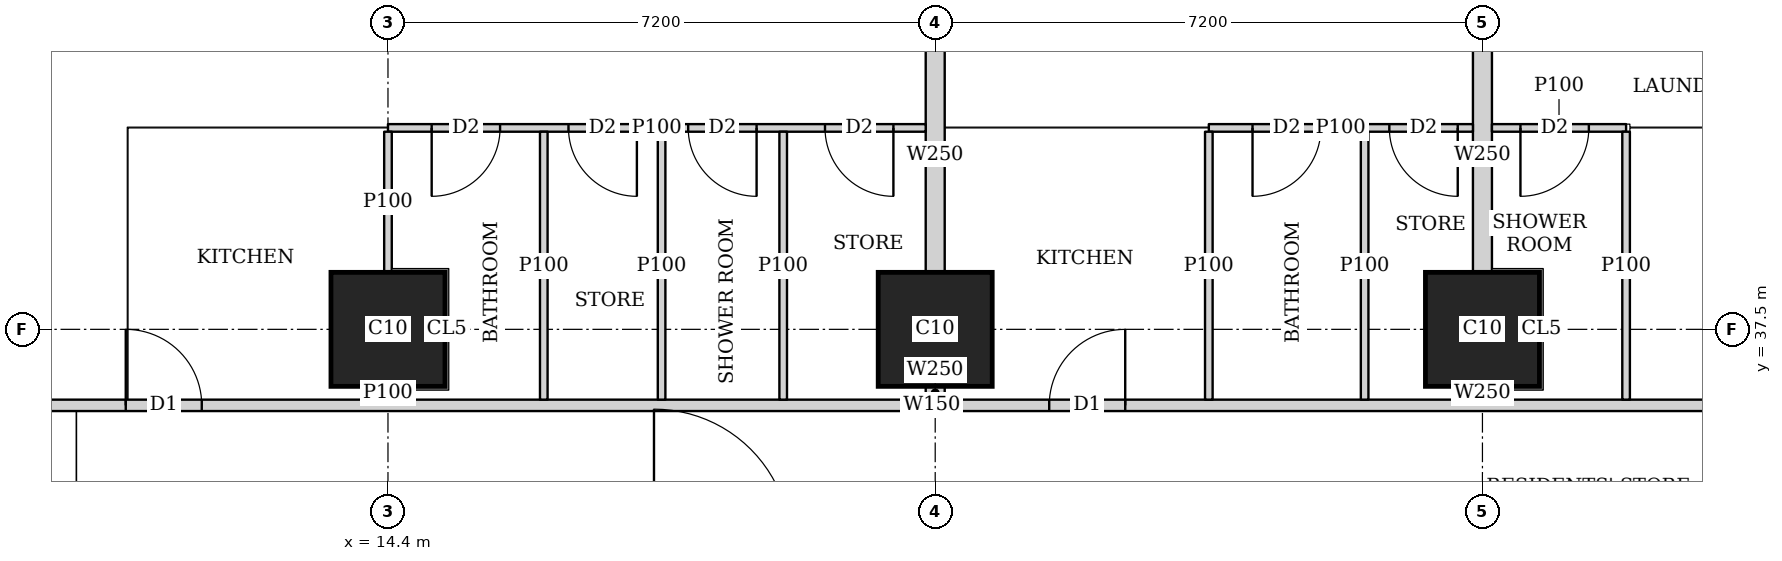
"""IFC4 building model, lengths in metres.
Left out: names, types, materials, properties, quantities, classifications, styles, units other than length and angle.
Written with IfcOpenShell. Run it as: python <this file> out.ifc"""

import sys

from ifc_helpers import new_model, si_unit, direction, frame, frame_2d, origin, origin_2d, place, context, subcontext, project, spatial, rectangle, extrude, element, fill, save


model = new_model("IFC4")
c1 = context("Model", 3, precision=1e-05, world=origin(), true_north=direction((0.0, 1.0)))
c2 = subcontext(c1, "Body", "Model", "MODEL_VIEW")
j1 = project(units=[si_unit("LENGTHUNIT", "METRE"), si_unit("PLANEANGLEUNIT", "RADIAN")], contexts=[c1])
p1 = place(None, origin())
s1 = spatial("IfcSite", under=j1, at=p1, CompositionType="ELEMENT")
p2 = place(p1, origin())
s2 = spatial("IfcBuilding", under=s1, at=p2, CompositionType="ELEMENT")
p3 = place(p2, frame((0.0, 0.0, 184.55)))
s3 = spatial("IfcBuildingStorey", under=s2, at=p3, CompositionType="ELEMENT", Elevation=184.55)
for number, where, z_axis, x_axis in (
    (1, (14.4, 37.5, 0.0), (0.0, 0.0, 1.0), (1.0, 0.0, 0.0)),
    (2, (21.6, 37.5, 0.0), (0.0, 0.0, 1.0), (1.0, 0.0, 0.0)),
    (3, (28.8, 37.5, 0.0), (0.0, 0.0, 1.0), (1.0, 0.0, 0.0)),
):
    element("IfcColumn", number, at=place(p3, frame(where, z_axis=z_axis, x_axis=x_axis)), inside=s3, PredefinedType="COLUMN", context=c2, shape_type="SweptSolid", body=[
        extrude(rectangle(XDim=1.5, YDim=1.5, at=origin_2d()), origin(), (0.0, 0.0, 1.0), 3.75),
    ])
p4 = place(p3, frame((8.35, 36.5, 0.0), z_axis=(0.0, 0.0, 1.0), x_axis=(1.0, 0.0, 0.0)))
e4 = element("IfcWall", 4, at=p4, inside=s3, PredefinedType="SOLIDWALL", context=c2, shape_type="SweptSolid", body=[
    extrude(rectangle(XDim=26.415, YDim=0.15, at=frame_2d((13.208, 0.0))), origin(), (0.0, 0.0, 1.0), 3.45),
])
p5 = place(p4, frame((2.6, 0.0, 0.0)))
e5 = element("IfcOpeningElement", 5, at=p5, cuts=e4, PredefinedType="OPENING", context=c2, shape_type="SweptSolid", body=[
    extrude(rectangle(XDim=1.0, YDim=2.1, at=frame_2d((0.5, 1.05))), frame((0.0, 0.085, 0.0), z_axis=(0.0, -1.0, 0.0), x_axis=(1.0, 0.0, 0.0)), (0.0, 0.0, 1.0), 0.17),
])
p6 = place(p4, frame((14.75, 0.0, 0.0)))
e6 = element("IfcOpeningElement", 6, at=p6, cuts=e4, PredefinedType="OPENING", context=c2, shape_type="SweptSolid", body=[
    extrude(rectangle(XDim=1.0, YDim=2.1, at=frame_2d((0.5, 1.05))), frame((0.0, 0.085, 0.0), z_axis=(0.0, -1.0, 0.0), x_axis=(1.0, 0.0, 0.0)), (0.0, 0.0, 1.0), 0.17),
])
p7 = place(p4, frame((23.923, 0.0, 0.0)))
e7 = element("IfcOpeningElement", 7, at=p7, cuts=e4, PredefinedType="OPENING", context=c2, shape_type="SweptSolid", body=[
    extrude(rectangle(XDim=1.0, YDim=2.1, at=frame_2d((0.5, 1.05))), frame((0.0, 0.085, 0.0), z_axis=(0.0, -1.0, 0.0), x_axis=(1.0, 0.0, 0.0)), (0.0, 0.0, 1.0), 0.17),
])
p8 = place(p3, frame((14.4, 40.15, 0.0), z_axis=(0.0, 0.0, 1.0), x_axis=(1.0, 0.0, 0.0)))
e8 = element("IfcWall", 8, at=p8, inside=s3, PredefinedType="PARTITIONING", context=c2, shape_type="SweptSolid", body=[
    extrude(rectangle(XDim=7.075, YDim=0.1, at=frame_2d((3.538, 0.0))), origin(), (0.0, 0.0, 1.0), 3.45),
])
p9 = place(p8, frame((0.575, 0.0, 0.0)))
e9 = element("IfcOpeningElement", 9, at=p9, cuts=e8, PredefinedType="OPENING", context=c2, shape_type="SweptSolid", body=[
    extrude(rectangle(XDim=0.9, YDim=2.1, at=frame_2d((0.45, 1.05))), frame((0.0, 0.06, 0.0), z_axis=(0.0, -1.0, 0.0), x_axis=(1.0, 0.0, 0.0)), (0.0, 0.0, 1.0), 0.12),
])
p10 = place(p8, frame((3.95, 0.0, 0.0)))
e10 = element("IfcOpeningElement", 10, at=p10, cuts=e8, PredefinedType="OPENING", context=c2, shape_type="SweptSolid", body=[
    extrude(rectangle(XDim=0.9, YDim=2.1, at=frame_2d((0.45, 1.05))), frame((0.0, 0.06, 0.0), z_axis=(0.0, -1.0, 0.0), x_axis=(1.0, 0.0, 0.0)), (0.0, 0.0, 1.0), 0.12),
])
p11 = place(p8, frame((2.375, 0.0, 0.0)))
e11 = element("IfcOpeningElement", 11, at=p11, cuts=e8, PredefinedType="OPENING", context=c2, shape_type="SweptSolid", body=[
    extrude(rectangle(XDim=0.9, YDim=2.1, at=frame_2d((0.45, 1.05))), frame((0.0, 0.06, 0.0), z_axis=(0.0, -1.0, 0.0), x_axis=(1.0, 0.0, 0.0)), (0.0, 0.0, 1.0), 0.12),
])
p12 = place(p8, frame((5.75, 0.0, 0.0)))
e12 = element("IfcOpeningElement", 12, at=p12, cuts=e8, PredefinedType="OPENING", context=c2, shape_type="SweptSolid", body=[
    extrude(rectangle(XDim=0.9, YDim=2.1, at=frame_2d((0.45, 1.05))), frame((0.0, 0.06, 0.0), z_axis=(0.0, -1.0, 0.0), x_axis=(1.0, 0.0, 0.0)), (0.0, 0.0, 1.0), 0.12),
])
p13 = place(p3, frame((14.4, 36.575, 0.0), z_axis=(0.0, 0.0, 1.0), x_axis=(0.0, 1.0, 0.0)))
e13 = element("IfcWall", 13, at=p13, inside=s3, PredefinedType="PARTITIONING", context=c2, shape_type="SweptSolid", body=[
    extrude(rectangle(XDim=0.174, YDim=0.1, at=frame_2d((0.087, 0.0))), origin(), (0.0, 0.0, 1.0), 3.45),
])
p14 = place(p3, frame((14.4, 38.251, 0.0), z_axis=(0.0, 0.0, 1.0), x_axis=(0.0, 1.0, 0.0)))
e14 = element("IfcWall", 14, at=p14, inside=s3, PredefinedType="PARTITIONING", context=c2, shape_type="SweptSolid", body=[
    extrude(rectangle(XDim=1.849, YDim=0.1, at=frame_2d((0.925, 0.0))), origin(), (0.0, 0.0, 1.0), 3.45),
])
for number, where, z_axis, x_axis in (
    (15, (18.0, 36.575, 0.0), (0.0, 0.0, 1.0), (0.0, 1.0, 0.0)),
    (16, (16.45, 36.575, 0.0), (0.0, 0.0, 1.0), (0.0, 1.0, 0.0)),
    (17, (19.6, 36.575, 0.0), (0.0, 0.0, 1.0), (0.0, 1.0, 0.0)),
):
    element("IfcWall", number, at=place(p3, frame(where, z_axis=z_axis, x_axis=x_axis)), inside=s3, PredefinedType="PARTITIONING", context=c2, shape_type="SweptSolid", body=[
        extrude(rectangle(XDim=3.525, YDim=0.1, at=frame_2d((1.763, 0.0))), origin(), (0.0, 0.0, 1.0), 3.45),
    ])
p15 = place(p3, frame((25.2, 40.15, 0.0), z_axis=(0.0, 0.0, 1.0), x_axis=(1.0, 0.0, 0.0)))
e18 = element("IfcWall", 18, at=p15, inside=s3, PredefinedType="PARTITIONING", context=c2, shape_type="SweptSolid", body=[
    extrude(rectangle(XDim=3.475, YDim=0.1, at=frame_2d((1.738, 0.0))), origin(), (0.0, 0.0, 1.0), 3.45),
])
p16 = place(p15, frame((0.575, 0.0, 0.0)))
e19 = element("IfcOpeningElement", 19, at=p16, cuts=e18, PredefinedType="OPENING", context=c2, shape_type="SweptSolid", body=[
    extrude(rectangle(XDim=0.9, YDim=2.1, at=frame_2d((0.45, 1.05))), frame((0.0, 0.06, 0.0), z_axis=(0.0, -1.0, 0.0), x_axis=(1.0, 0.0, 0.0)), (0.0, 0.0, 1.0), 0.12),
])
p17 = place(p15, frame((2.375, 0.0, 0.0)))
e20 = element("IfcOpeningElement", 20, at=p17, cuts=e18, PredefinedType="OPENING", context=c2, shape_type="SweptSolid", body=[
    extrude(rectangle(XDim=0.9, YDim=2.1, at=frame_2d((0.45, 1.05))), frame((0.0, 0.06, 0.0), z_axis=(0.0, -1.0, 0.0), x_axis=(1.0, 0.0, 0.0)), (0.0, 0.0, 1.0), 0.12),
])
for number, where, z_axis, x_axis in (
    (21, (25.2, 36.575, 0.0), (0.0, 0.0, 1.0), (0.0, 1.0, 0.0)),
    (22, (27.25, 36.575, 0.0), (0.0, 0.0, 1.0), (0.0, 1.0, 0.0)),
):
    element("IfcWall", number, at=place(p3, frame(where, z_axis=z_axis, x_axis=x_axis)), inside=s3, PredefinedType="PARTITIONING", context=c2, shape_type="SweptSolid", body=[
        extrude(rectangle(XDim=3.525, YDim=0.1, at=frame_2d((1.763, 0.0))), origin(), (0.0, 0.0, 1.0), 3.45),
    ])
p18 = place(p3, frame((21.6, 36.575, 0.0), z_axis=(0.0, 0.0, 1.0), x_axis=(0.0, 1.0, 0.0)))
e23 = element("IfcWall", 23, at=p18, inside=s3, PredefinedType="SOLIDWALL", context=c2, shape_type="SweptSolid", body=[
    extrude(rectangle(XDim=0.174, YDim=0.25, at=frame_2d((0.087, 0.0))), origin(), (0.0, 0.0, 1.0), 3.45),
])
p19 = place(p3, frame((21.6, 38.251, 0.0), z_axis=(0.0, 0.0, 1.0), x_axis=(0.0, 1.0, 0.0)))
e24 = element("IfcWall", 24, at=p19, inside=s3, PredefinedType="SOLIDWALL", context=c2, shape_type="SweptSolid", body=[
    extrude(rectangle(XDim=3.099, YDim=0.25, at=frame_2d((1.55, 0.0))), origin(), (0.0, 0.0, 1.0), 3.45),
])
p20 = place(p3, frame((28.925, 40.15, 0.0), z_axis=(0.0, 0.0, 1.0), x_axis=(1.0, 0.0, 0.0)))
e25 = element("IfcWall", 25, at=p20, inside=s3, PredefinedType="PARTITIONING", context=c2, shape_type="SweptSolid", body=[
    extrude(rectangle(XDim=1.765, YDim=0.1, at=frame_2d((0.882, 0.0))), origin(), (0.0, 0.0, 1.0), 3.45),
])
p21 = place(p20, frame((0.375, 0.0, 0.0)))
e26 = element("IfcOpeningElement", 26, at=p21, cuts=e25, PredefinedType="OPENING", context=c2, shape_type="SweptSolid", body=[
    extrude(rectangle(XDim=0.9, YDim=2.1, at=frame_2d((0.45, 1.05))), frame((0.0, 0.06, 0.0), z_axis=(0.0, -1.0, 0.0), x_axis=(1.0, 0.0, 0.0)), (0.0, 0.0, 1.0), 0.12),
])
p22 = place(p3, frame((30.69, 36.575, 0.0), z_axis=(0.0, 0.0, 1.0), x_axis=(0.0, 1.0, 0.0)))
e27 = element("IfcWall", 27, at=p22, inside=s3, PredefinedType="PARTITIONING", context=c2, shape_type="SweptSolid", body=[
    extrude(rectangle(XDim=3.525, YDim=0.1, at=frame_2d((1.763, 0.0))), origin(), (0.0, 0.0, 1.0), 3.45),
])
p23 = place(p3, frame((28.8, 36.575, 0.0), z_axis=(0.0, 0.0, 1.0), x_axis=(0.0, 1.0, 0.0)))
e28 = element("IfcWall", 28, at=p23, inside=s3, PredefinedType="SOLIDWALL", context=c2, shape_type="SweptSolid", body=[
    extrude(rectangle(XDim=0.174, YDim=0.25, at=frame_2d((0.087, 0.0))), origin(), (0.0, 0.0, 1.0), 3.45),
])
p24 = place(p3, frame((28.8, 38.251, 0.0), z_axis=(0.0, 0.0, 1.0), x_axis=(0.0, 1.0, 0.0)))
e29 = element("IfcWall", 29, at=p24, inside=s3, PredefinedType="SOLIDWALL", context=c2, shape_type="SweptSolid", body=[
    extrude(rectangle(XDim=3.099, YDim=0.25, at=frame_2d((1.55, 0.0))), origin(), (0.0, 0.0, 1.0), 3.45),
])
p25 = place(p9, origin())
e30 = element("IfcDoor", 30, at=p25, inside=s3, OperationType="SINGLE_SWING_RIGHT", PredefinedType="DOOR", context=c2, shape_type="SweptSolid", body=[
    extrude(rectangle(XDim=0.9, YDim=2.1, at=frame_2d((0.45, 1.05))), frame((0.0, 0.025, 0.0), z_axis=(0.0, -1.0, 0.0), x_axis=(1.0, 0.0, 0.0)), (0.0, 0.0, 1.0), 0.05),
])
fill(e9, e30)
p26 = place(p10, origin())
e31 = element("IfcDoor", 31, at=p26, inside=s3, OperationType="SINGLE_SWING_LEFT", PredefinedType="DOOR", context=c2, shape_type="SweptSolid", body=[
    extrude(rectangle(XDim=0.9, YDim=2.1, at=frame_2d((0.45, 1.05))), frame((0.0, 0.025, 0.0), z_axis=(0.0, -1.0, 0.0), x_axis=(1.0, 0.0, 0.0)), (0.0, 0.0, 1.0), 0.05),
])
fill(e10, e31)
p27 = place(p11, origin())
e32 = element("IfcDoor", 32, at=p27, inside=s3, OperationType="SINGLE_SWING_LEFT", PredefinedType="DOOR", context=c2, shape_type="SweptSolid", body=[
    extrude(rectangle(XDim=0.9, YDim=2.1, at=frame_2d((0.45, 1.05))), frame((0.0, 0.025, 0.0), z_axis=(0.0, -1.0, 0.0), x_axis=(1.0, 0.0, 0.0)), (0.0, 0.0, 1.0), 0.05),
])
fill(e11, e32)
p28 = place(p12, origin())
e33 = element("IfcDoor", 33, at=p28, inside=s3, OperationType="SINGLE_SWING_LEFT", PredefinedType="DOOR", context=c2, shape_type="SweptSolid", body=[
    extrude(rectangle(XDim=0.9, YDim=2.1, at=frame_2d((0.45, 1.05))), frame((0.0, 0.025, 0.0), z_axis=(0.0, -1.0, 0.0), x_axis=(1.0, 0.0, 0.0)), (0.0, 0.0, 1.0), 0.05),
])
fill(e12, e33)
p29 = place(p5, origin())
e34 = element("IfcDoor", 34, at=p29, inside=s3, OperationType="SINGLE_SWING_LEFT", PredefinedType="DOOR", context=c2, shape_type="SweptSolid", body=[
    extrude(rectangle(XDim=1.0, YDim=2.1, at=frame_2d((0.5, 1.05))), frame((0.0, 0.025, 0.0), z_axis=(0.0, -1.0, 0.0), x_axis=(1.0, 0.0, 0.0)), (0.0, 0.0, 1.0), 0.05),
])
fill(e5, e34)
p30 = place(p16, origin())
e35 = element("IfcDoor", 35, at=p30, inside=s3, OperationType="SINGLE_SWING_RIGHT", PredefinedType="DOOR", context=c2, shape_type="SweptSolid", body=[
    extrude(rectangle(XDim=0.9, YDim=2.1, at=frame_2d((0.45, 1.05))), frame((0.0, 0.025, 0.0), z_axis=(0.0, -1.0, 0.0), x_axis=(1.0, 0.0, 0.0)), (0.0, 0.0, 1.0), 0.05),
])
fill(e19, e35)
p31 = place(p17, origin())
e36 = element("IfcDoor", 36, at=p31, inside=s3, OperationType="SINGLE_SWING_LEFT", PredefinedType="DOOR", context=c2, shape_type="SweptSolid", body=[
    extrude(rectangle(XDim=0.9, YDim=2.1, at=frame_2d((0.45, 1.05))), frame((0.0, 0.025, 0.0), z_axis=(0.0, -1.0, 0.0), x_axis=(1.0, 0.0, 0.0)), (0.0, 0.0, 1.0), 0.05),
])
fill(e20, e36)
p32 = place(p6, origin())
e37 = element("IfcDoor", 37, at=p32, inside=s3, OperationType="SINGLE_SWING_RIGHT", PredefinedType="DOOR", context=c2, shape_type="SweptSolid", body=[
    extrude(rectangle(XDim=1.0, YDim=2.1, at=frame_2d((0.5, 1.05))), frame((0.0, 0.025, 0.0), z_axis=(0.0, -1.0, 0.0), x_axis=(1.0, 0.0, 0.0)), (0.0, 0.0, 1.0), 0.05),
])
fill(e6, e37)
p33 = place(p21, origin())
e38 = element("IfcDoor", 38, at=p33, inside=s3, OperationType="SINGLE_SWING_RIGHT", PredefinedType="DOOR", context=c2, shape_type="SweptSolid", body=[
    extrude(rectangle(XDim=0.9, YDim=2.1, at=frame_2d((0.45, 1.05))), frame((0.0, 0.025, 0.0), z_axis=(0.0, -1.0, 0.0), x_axis=(1.0, 0.0, 0.0)), (0.0, 0.0, 1.0), 0.05),
])
fill(e26, e38)
save(model, sys.argv[1])
